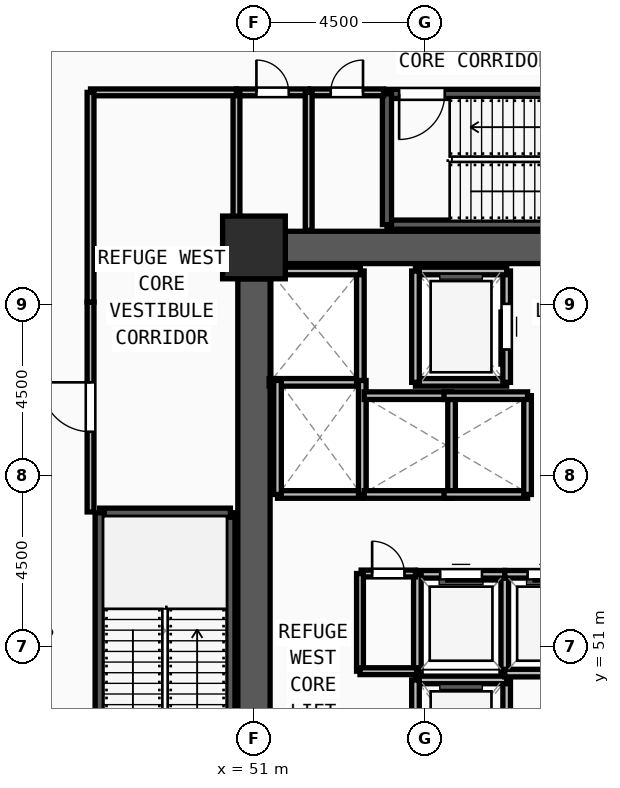
"""IFC4 building model, lengths in metres.
Left out: names, types, materials, properties, quantities, classifications, styles, units other than length and angle.
Written with IfcOpenShell. Run it as: python <this file> out.ifc"""

import sys

from ifc_helpers import new_model, si_unit, direction, frame, frame_2d, origin, origin_2d, place, context, subcontext, project, spatial, rectangle, extrude, source, transform, mapped, element, fill, save


model = new_model("IFC4")
c1 = context("Model", 3, precision=1e-05, world=origin(), true_north=direction((0.0, 1.0)))
c2 = subcontext(c1, "Body", "Model", "MODEL_VIEW")
j1 = project(units=[si_unit("LENGTHUNIT", "METRE"), si_unit("PLANEANGLEUNIT", "RADIAN")], contexts=[c1])
p1 = place(None, origin())
s1 = spatial("IfcSite", under=j1, at=p1, CompositionType="ELEMENT")
p2 = place(p1, origin())
s2 = spatial("IfcBuilding", under=s1, at=p2, CompositionType="ELEMENT")
p3 = place(p2, frame((0.0, 0.0, 93.0)))
s3 = spatial("IfcBuildingStorey", under=s2, at=p3, CompositionType="ELEMENT", Elevation=93.0)
m1 = source(origin(), c2, "Body", "SweptSolid", [
    extrude(rectangle(XDim=1.65, YDim=1.65, at=origin_2d()), origin(), (0.0, 0.0, 1.0), 4.5),
])
p4 = place(p3, frame((51.0, 61.5, 0.0), z_axis=(0.0, 0.0, 1.0), x_axis=(1.0, 0.0, 0.0)))
e1 = element("IfcColumn", 1, at=p4, inside=s3, PredefinedType="COLUMN", context=c2, shape_type="MappedRepresentation", body=[
    mapped(m1, transform((0.0, 0.0, 0.0), x_axis=(1.0, 0.0, 0.0), y_axis=(0.0, 1.0, 0.0), z_axis=(0.0, 0.0, 1.0), scale=1.0)),
])
p5 = place(p3, frame((51.825, 61.5, 0.0), z_axis=(0.0, 0.0, 1.0), x_axis=(1.0, 0.0, 0.0)))
e2 = element("IfcWall", 2, at=p5, inside=s3, PredefinedType="SHEAR", context=c2, shape_type="SweptSolid", body=[
    extrude(rectangle(XDim=7.35, YDim=0.85, at=frame_2d((3.675, 0.0))), origin(), (0.0, 0.0, 1.0), 4.22),
])
p6 = place(p3, frame((51.0, 47.325, 0.0), z_axis=(0.0, 0.0, 1.0), x_axis=(0.0, 1.0, 0.0)))
e3 = element("IfcWall", 3, at=p6, inside=s3, PredefinedType="SHEAR", context=c2, shape_type="SweptSolid", body=[
    extrude(rectangle(XDim=13.35, YDim=0.85, at=frame_2d((6.675, 0.0))), origin(), (0.0, 0.0, 1.0), 4.22),
])
p7 = place(p3, frame((50.38, 46.7, 0.0), z_axis=(0.0, 0.0, 1.0), x_axis=(0.0, 1.0, 0.0)))
e4 = element("IfcWall", 4, at=p7, inside=s3, PredefinedType="SOLIDWALL", context=c2, shape_type="SweptSolid", body=[
    extrude(rectangle(XDim=7.82, YDim=0.24, at=frame_2d((3.91, 0.0))), origin(), (0.0, 0.0, 1.0), 4.22),
])
p8 = place(p3, frame((50.38, 54.52, 0.0), z_axis=(0.0, 0.0, 1.0), x_axis=(-1.0, 0.0, 0.0)))
e5 = element("IfcWall", 5, at=p8, inside=s3, PredefinedType="SOLIDWALL", context=c2, shape_type="SweptSolid", body=[
    extrude(rectangle(XDim=3.44, YDim=0.24, at=frame_2d((1.72, 0.0))), origin(), (0.0, 0.0, 1.0), 4.22),
])
p9 = place(p3, frame((46.94, 54.52, 0.0), z_axis=(0.0, 0.0, 1.0), x_axis=(0.0, -1.0, 0.0)))
e6 = element("IfcWall", 6, at=p9, inside=s3, PredefinedType="SOLIDWALL", context=c2, shape_type="SweptSolid", body=[
    extrude(rectangle(XDim=7.82, YDim=0.24, at=frame_2d((3.91, 0.0))), origin(), (0.0, 0.0, 1.0), 4.22),
])
m2 = source(origin(), c2, "Body", "SweptSolid", [
    extrude(rectangle(XDim=1.2, YDim=2.2, at=frame_2d((0.6, 1.1))), frame((0.0, 0.13, 0.0), z_axis=(0.0, -1.0, 0.0), x_axis=(1.0, 0.0, 0.0)), (0.0, 0.0, 1.0), 0.26),
])
p10 = place(p9, frame((6.3, 0.0, 0.0)))
e7 = element("IfcOpeningElement", 7, at=p10, cuts=e6, PredefinedType="OPENING", context=c2, shape_type="MappedRepresentation", body=[
    mapped(m2, transform((0.0, 0.0, 0.0), x_axis=(1.0, 0.0, 0.0), y_axis=(0.0, 1.0, 0.0), z_axis=(0.0, 0.0, 1.0), scale=1.0)),
])
p11 = place(p3, frame((54.5, 62.1, 0.0), z_axis=(0.0, 0.0, 1.0), x_axis=(1.0, 0.0, 0.0)))
e8 = element("IfcWall", 8, at=p11, inside=s3, PredefinedType="SOLIDWALL", context=c2, shape_type="SweptSolid", body=[
    extrude(rectangle(XDim=7.82, YDim=0.24, at=frame_2d((3.91, 0.0))), origin(), (0.0, 0.0, 1.0), 4.22),
])
p12 = place(p3, frame((62.32, 65.54, 0.0), z_axis=(0.0, 0.0, 1.0), x_axis=(-1.0, 0.0, 0.0)))
e9 = element("IfcWall", 9, at=p12, inside=s3, PredefinedType="SOLIDWALL", context=c2, shape_type="SweptSolid", body=[
    extrude(rectangle(XDim=7.82, YDim=0.24, at=frame_2d((3.91, 0.0))), origin(), (0.0, 0.0, 1.0), 4.22),
])
p13 = place(p12, frame((6.3, 0.0, 0.0)))
e10 = element("IfcOpeningElement", 10, at=p13, cuts=e9, PredefinedType="OPENING", context=c2, shape_type="MappedRepresentation", body=[
    mapped(m2, transform((0.0, 0.0, 0.0), x_axis=(1.0, 0.0, 0.0), y_axis=(0.0, 1.0, 0.0), z_axis=(0.0, 0.0, 1.0), scale=1.0)),
])
p14 = place(p3, frame((54.5, 65.54, 0.0), z_axis=(0.0, 0.0, 1.0), x_axis=(0.0, -1.0, 0.0)))
e11 = element("IfcWall", 11, at=p14, inside=s3, PredefinedType="SOLIDWALL", context=c2, shape_type="SweptSolid", body=[
    extrude(rectangle(XDim=3.44, YDim=0.24, at=frame_2d((1.72, 0.0))), origin(), (0.0, 0.0, 1.0), 4.22),
])
p15 = place(p3, frame((57.65, 47.12, 0.0), z_axis=(0.0, 0.0, 1.0), x_axis=(0.0, 1.0, 0.0)))
e12 = element("IfcWall", 12, at=p15, inside=s3, PredefinedType="SOLIDWALL", context=c2, shape_type="SweptSolid", body=[
    extrude(rectangle(XDim=3.0, YDim=0.2, at=frame_2d((1.5, 0.0))), origin(), (0.0, 0.0, 1.0), 4.22),
])
m3 = source(origin(), c2, "Body", "SweptSolid", [
    extrude(rectangle(XDim=1.2, YDim=2.3, at=frame_2d((0.6, 1.15))), frame((0.0, 0.11, 0.0), z_axis=(0.0, -1.0, 0.0), x_axis=(1.0, 0.0, 0.0)), (0.0, 0.0, 1.0), 0.22),
])
p16 = place(p15, frame((0.9, 0.0, 0.0)))
e13 = element("IfcOpeningElement", 13, at=p16, cuts=e12, PredefinedType="OPENING", context=c2, shape_type="MappedRepresentation", body=[
    mapped(m3, transform((0.0, 0.0, 0.0), x_axis=(1.0, 0.0, 0.0), y_axis=(0.0, 1.0, 0.0), z_axis=(0.0, 0.0, 1.0), scale=1.0)),
])
p17 = place(p3, frame((57.65, 50.12, 0.0), z_axis=(0.0, 0.0, 1.0), x_axis=(-1.0, 0.0, 0.0)))
e14 = element("IfcWall", 14, at=p17, inside=s3, PredefinedType="SOLIDWALL", context=c2, shape_type="SweptSolid", body=[
    extrude(rectangle(XDim=2.4, YDim=0.2, at=frame_2d((1.2, 0.0))), origin(), (0.0, 0.0, 1.0), 4.22),
])
p18 = place(p3, frame((55.25, 50.12, 0.0), z_axis=(0.0, 0.0, 1.0), x_axis=(0.0, -1.0, 0.0)))
e15 = element("IfcWall", 15, at=p18, inside=s3, PredefinedType="SOLIDWALL", context=c2, shape_type="SweptSolid", body=[
    extrude(rectangle(XDim=3.0, YDim=0.2, at=frame_2d((1.5, 0.0))), origin(), (0.0, 0.0, 1.0), 4.22),
])
p19 = place(p3, frame((55.25, 57.95, 0.0), z_axis=(0.0, 0.0, 1.0), x_axis=(1.0, 0.0, 0.0)))
e16 = element("IfcWall", 16, at=p19, inside=s3, PredefinedType="SOLIDWALL", context=c2, shape_type="SweptSolid", body=[
    extrude(rectangle(XDim=2.4, YDim=0.2, at=frame_2d((1.2, 0.0))), origin(), (0.0, 0.0, 1.0), 4.22),
])
p20 = place(p3, frame((57.65, 57.95, 0.0), z_axis=(0.0, 0.0, 1.0), x_axis=(0.0, 1.0, 0.0)))
e17 = element("IfcWall", 17, at=p20, inside=s3, PredefinedType="SOLIDWALL", context=c2, shape_type="SweptSolid", body=[
    extrude(rectangle(XDim=2.93, YDim=0.2, at=frame_2d((1.465, 0.0))), origin(), (0.0, 0.0, 1.0), 4.22),
])
p21 = place(p20, frame((0.865, 0.0, 0.0)))
e18 = element("IfcOpeningElement", 18, at=p21, cuts=e17, PredefinedType="OPENING", context=c2, shape_type="MappedRepresentation", body=[
    mapped(m3, transform((0.0, 0.0, 0.0), x_axis=(1.0, 0.0, 0.0), y_axis=(0.0, 1.0, 0.0), z_axis=(0.0, 0.0, 1.0), scale=1.0)),
])
p22 = place(p3, frame((57.65, 60.88, 0.0), z_axis=(0.0, 0.0, 1.0), x_axis=(-1.0, 0.0, 0.0)))
e19 = element("IfcWall", 19, at=p22, inside=s3, PredefinedType="SOLIDWALL", context=c2, shape_type="SweptSolid", body=[
    extrude(rectangle(XDim=2.4, YDim=0.2, at=frame_2d((1.2, 0.0))), origin(), (0.0, 0.0, 1.0), 4.22),
])
p23 = place(p3, frame((55.25, 60.88, 0.0), z_axis=(0.0, 0.0, 1.0), x_axis=(0.0, -1.0, 0.0)))
e20 = element("IfcWall", 20, at=p23, inside=s3, PredefinedType="SOLIDWALL", context=c2, shape_type="SweptSolid", body=[
    extrude(rectangle(XDim=2.93, YDim=0.2, at=frame_2d((1.465, 0.0))), origin(), (0.0, 0.0, 1.0), 4.22),
])
p24 = place(p3, frame((51.4, 57.95, 0.0), z_axis=(0.0, 0.0, 1.0), x_axis=(1.0, 0.0, 0.0)))
e21 = element("IfcWall", 21, at=p24, inside=s3, PredefinedType="SOLIDWALL", context=c2, shape_type="SweptSolid", body=[
    extrude(rectangle(XDim=2.4, YDim=0.2, at=frame_2d((1.2, 0.0))), origin(), (0.0, 0.0, 1.0), 4.22),
])
p25 = place(p3, frame((53.8, 57.95, 0.0), z_axis=(0.0, 0.0, 1.0), x_axis=(0.0, 1.0, 0.0)))
e22 = element("IfcWall", 22, at=p25, inside=s3, PredefinedType="SOLIDWALL", context=c2, shape_type="SweptSolid", body=[
    extrude(rectangle(XDim=2.93, YDim=0.2, at=frame_2d((1.465, 0.0))), origin(), (0.0, 0.0, 1.0), 4.22),
])
p26 = place(p3, frame((53.8, 60.88, 0.0), z_axis=(0.0, 0.0, 1.0), x_axis=(-1.0, 0.0, 0.0)))
e23 = element("IfcWall", 23, at=p26, inside=s3, PredefinedType="SOLIDWALL", context=c2, shape_type="SweptSolid", body=[
    extrude(rectangle(XDim=2.4, YDim=0.2, at=frame_2d((1.2, 0.0))), origin(), (0.0, 0.0, 1.0), 4.22),
])
p27 = place(p3, frame((51.62, 55.0, 0.0), z_axis=(0.0, 0.0, 1.0), x_axis=(1.0, 0.0, 0.0)))
e24 = element("IfcWall", 24, at=p27, inside=s3, PredefinedType="SOLIDWALL", context=c2, shape_type="SweptSolid", body=[
    extrude(rectangle(XDim=2.23, YDim=0.2, at=frame_2d((1.115, 0.0))), origin(), (0.0, 0.0, 1.0), 4.22),
])
for number, where, z_axis, x_axis in (
    (25, (53.85, 55.0, 0.0), (0.0, 0.0, 1.0), (0.0, 1.0, 0.0)),
    (26, (51.62, 58.0, 0.0), (0.0, 0.0, 1.0), (0.0, -1.0, 0.0)),
):
    element("IfcWall", number, at=place(p3, frame(where, z_axis=z_axis, x_axis=x_axis)), inside=s3, PredefinedType="SOLIDWALL", context=c2, shape_type="SweptSolid", body=[
        extrude(rectangle(XDim=3.0, YDim=0.2, at=frame_2d((1.5, 0.0))), origin(), (0.0, 0.0, 1.0), 4.22),
    ])
p28 = place(p3, frame((57.6, 50.3, 0.0), z_axis=(0.0, 0.0, 1.0), x_axis=(0.0, 1.0, 0.0)))
e27 = element("IfcWall", 27, at=p28, inside=s3, PredefinedType="SOLIDWALL", context=c2, shape_type="SweptSolid", body=[
    extrude(rectangle(XDim=2.6, YDim=0.2, at=frame_2d((1.3, 0.0))), origin(), (0.0, 0.0, 1.0), 4.22),
])
p29 = place(p3, frame((57.6, 52.9, 0.0), z_axis=(0.0, 0.0, 1.0), x_axis=(-1.0, 0.0, 0.0)))
e28 = element("IfcWall", 28, at=p29, inside=s3, PredefinedType="SOLIDWALL", context=c2, shape_type="SweptSolid", body=[
    extrude(rectangle(XDim=2.3, YDim=0.2, at=frame_2d((1.15, 0.0))), origin(), (0.0, 0.0, 1.0), 4.22),
])
m4 = source(origin(), c2, "Body", "SweptSolid", [
    extrude(rectangle(XDim=1.1, YDim=2.2, at=frame_2d((0.55, 1.1))), frame((0.0, 0.11, 0.0), z_axis=(0.0, -1.0, 0.0), x_axis=(1.0, 0.0, 0.0)), (0.0, 0.0, 1.0), 0.22),
])
p30 = place(p29, frame((0.6, 0.0, 0.0)))
e29 = element("IfcOpeningElement", 29, at=p30, cuts=e28, PredefinedType="OPENING", context=c2, shape_type="MappedRepresentation", body=[
    mapped(m4, transform((0.0, 0.0, 0.0), x_axis=(1.0, 0.0, 0.0), y_axis=(0.0, 1.0, 0.0), z_axis=(0.0, 0.0, 1.0), scale=1.0)),
])
p31 = place(p3, frame((55.3, 52.9, 0.0), z_axis=(0.0, 0.0, 1.0), x_axis=(0.0, -1.0, 0.0)))
e30 = element("IfcWall", 30, at=p31, inside=s3, PredefinedType="SOLIDWALL", context=c2, shape_type="SweptSolid", body=[
    extrude(rectangle(XDim=2.6, YDim=0.2, at=frame_2d((1.3, 0.0))), origin(), (0.0, 0.0, 1.0), 4.22),
])
p32 = place(p3, frame((57.6, 50.3, 0.0), z_axis=(0.0, 0.0, 1.0), x_axis=(1.0, 0.0, 0.0)))
e31 = element("IfcWall", 31, at=p32, inside=s3, PredefinedType="SOLIDWALL", context=c2, shape_type="SweptSolid", body=[
    extrude(rectangle(XDim=2.3, YDim=0.2, at=frame_2d((1.15, 0.0))), origin(), (0.0, 0.0, 1.0), 4.22),
])
p33 = place(p3, frame((59.9, 52.9, 0.0), z_axis=(0.0, 0.0, 1.0), x_axis=(-1.0, 0.0, 0.0)))
e32 = element("IfcWall", 32, at=p33, inside=s3, PredefinedType="SOLIDWALL", context=c2, shape_type="SweptSolid", body=[
    extrude(rectangle(XDim=2.3, YDim=0.2, at=frame_2d((1.15, 0.0))), origin(), (0.0, 0.0, 1.0), 4.22),
])
p34 = place(p33, frame((0.6, 0.0, 0.0)))
e33 = element("IfcOpeningElement", 33, at=p34, cuts=e32, PredefinedType="OPENING", context=c2, shape_type="MappedRepresentation", body=[
    mapped(m4, transform((0.0, 0.0, 0.0), x_axis=(1.0, 0.0, 0.0), y_axis=(0.0, 1.0, 0.0), z_axis=(0.0, 0.0, 1.0), scale=1.0)),
])
p35 = place(p3, frame((53.9, 55.0, 0.0), z_axis=(0.0, 0.0, 1.0), x_axis=(1.0, 0.0, 0.0)))
e34 = element("IfcWall", 34, at=p35, inside=s3, PredefinedType="SOLIDWALL", context=c2, shape_type="SweptSolid", body=[
    extrude(rectangle(XDim=2.3, YDim=0.2, at=frame_2d((1.15, 0.0))), origin(), (0.0, 0.0, 1.0), 4.22),
])
p36 = place(p3, frame((56.2, 55.0, 0.0), z_axis=(0.0, 0.0, 1.0), x_axis=(0.0, 1.0, 0.0)))
e35 = element("IfcWall", 35, at=p36, inside=s3, PredefinedType="SOLIDWALL", context=c2, shape_type="SweptSolid", body=[
    extrude(rectangle(XDim=2.6, YDim=0.2, at=frame_2d((1.3, 0.0))), origin(), (0.0, 0.0, 1.0), 4.22),
])
p37 = place(p3, frame((56.2, 57.6, 0.0), z_axis=(0.0, 0.0, 1.0), x_axis=(-1.0, 0.0, 0.0)))
e36 = element("IfcWall", 36, at=p37, inside=s3, PredefinedType="SOLIDWALL", context=c2, shape_type="SweptSolid", body=[
    extrude(rectangle(XDim=2.3, YDim=0.2, at=frame_2d((1.15, 0.0))), origin(), (0.0, 0.0, 1.0), 4.22),
])
p38 = place(p3, frame((56.0, 55.0, 0.0), z_axis=(0.0, 0.0, 1.0), x_axis=(1.0, 0.0, 0.0)))
e37 = element("IfcWall", 37, at=p38, inside=s3, PredefinedType="SOLIDWALL", context=c2, shape_type="SweptSolid", body=[
    extrude(rectangle(XDim=2.2, YDim=0.2, at=frame_2d((1.1, 0.0))), origin(), (0.0, 0.0, 1.0), 4.22),
])
p39 = place(p3, frame((58.2, 55.0, 0.0), z_axis=(0.0, 0.0, 1.0), x_axis=(0.0, 1.0, 0.0)))
e38 = element("IfcWall", 38, at=p39, inside=s3, PredefinedType="SOLIDWALL", context=c2, shape_type="SweptSolid", body=[
    extrude(rectangle(XDim=2.6, YDim=0.2, at=frame_2d((1.3, 0.0))), origin(), (0.0, 0.0, 1.0), 4.22),
])
p40 = place(p3, frame((58.2, 57.6, 0.0), z_axis=(0.0, 0.0, 1.0), x_axis=(-1.0, 0.0, 0.0)))
e39 = element("IfcWall", 39, at=p40, inside=s3, PredefinedType="SOLIDWALL", context=c2, shape_type="SweptSolid", body=[
    extrude(rectangle(XDim=2.2, YDim=0.2, at=frame_2d((1.1, 0.0))), origin(), (0.0, 0.0, 1.0), 4.22),
])
p41 = place(p3, frame((53.82, 52.92, 0.0), z_axis=(0.0, 0.0, 1.0), x_axis=(1.0, 0.0, 0.0)))
e40 = element("IfcWall", 40, at=p41, inside=s3, PredefinedType="PARTITIONING", context=c2, shape_type="SweptSolid", body=[
    extrude(rectangle(XDim=1.43, YDim=0.18, at=frame_2d((0.715, 0.0))), origin(), (0.0, 0.0, 1.0), 4.22),
])
m5 = source(origin(), c2, "Body", "SweptSolid", [
    extrude(rectangle(XDim=0.85, YDim=2.1, at=frame_2d((0.425, 1.05))), frame((0.0, 0.1, 0.0), z_axis=(0.0, -1.0, 0.0), x_axis=(1.0, 0.0, 0.0)), (0.0, 0.0, 1.0), 0.2),
])
p42 = place(p41, frame((0.29, 0.0, 0.0)))
e41 = element("IfcOpeningElement", 41, at=p42, cuts=e40, PredefinedType="OPENING", context=c2, shape_type="MappedRepresentation", body=[
    mapped(m5, transform((0.0, 0.0, 0.0), x_axis=(1.0, 0.0, 0.0), y_axis=(0.0, 1.0, 0.0), z_axis=(0.0, 0.0, 1.0), scale=1.0)),
])
p43 = place(p3, frame((50.54, 65.58, 0.0), z_axis=(0.0, 0.0, 1.0), x_axis=(1.0, 0.0, 0.0)))
e42 = element("IfcWall", 42, at=p43, inside=s3, PredefinedType="PARTITIONING", context=c2, shape_type="SweptSolid", body=[
    extrude(rectangle(XDim=1.9, YDim=0.18, at=frame_2d((0.95, 0.0))), origin(), (0.0, 0.0, 1.0), 4.22),
])
p44 = place(p43, frame((0.525, 0.0, 0.0)))
e43 = element("IfcOpeningElement", 43, at=p44, cuts=e42, PredefinedType="OPENING", context=c2, shape_type="MappedRepresentation", body=[
    mapped(m5, transform((0.0, 0.0, 0.0), x_axis=(1.0, 0.0, 0.0), y_axis=(0.0, 1.0, 0.0), z_axis=(0.0, 0.0, 1.0), scale=1.0)),
])
p45 = place(p3, frame((52.48, 65.58, 0.0), z_axis=(0.0, 0.0, 1.0), x_axis=(1.0, 0.0, 0.0)))
e44 = element("IfcWall", 44, at=p45, inside=s3, PredefinedType="PARTITIONING", context=c2, shape_type="SweptSolid", body=[
    extrude(rectangle(XDim=1.93, YDim=0.18, at=frame_2d((0.965, 0.0))), origin(), (0.0, 0.0, 1.0), 4.22),
])
p46 = place(p45, frame((0.54, 0.0, 0.0)))
e45 = element("IfcOpeningElement", 45, at=p46, cuts=e44, PredefinedType="OPENING", context=c2, shape_type="MappedRepresentation", body=[
    mapped(m5, transform((0.0, 0.0, 0.0), x_axis=(1.0, 0.0, 0.0), y_axis=(0.0, 1.0, 0.0), z_axis=(0.0, 0.0, 1.0), scale=1.0)),
])
p47 = place(p3, frame((46.7, 54.54, 0.0), z_axis=(0.0, 0.0, 1.0), x_axis=(0.0, 1.0, 0.0)))
e46 = element("IfcWall", 46, at=p47, inside=s3, PredefinedType="PARTITIONING", context=c2, shape_type="SweptSolid", body=[
    extrude(rectangle(XDim=5.52, YDim=0.18, at=frame_2d((2.76, 0.0))), origin(), (0.0, 0.0, 1.0), 4.22),
])
m6 = source(origin(), c2, "Body", "SweptSolid", [
    extrude(rectangle(XDim=1.3, YDim=2.2, at=frame_2d((0.65, 1.1))), frame((0.0, 0.1, 0.0), z_axis=(0.0, -1.0, 0.0), x_axis=(1.0, 0.0, 0.0)), (0.0, 0.0, 1.0), 0.2),
])
p48 = place(p47, frame((2.11, 0.0, 0.0)))
e47 = element("IfcOpeningElement", 47, at=p48, cuts=e46, PredefinedType="OPENING", context=c2, shape_type="MappedRepresentation", body=[
    mapped(m6, transform((0.0, 0.0, 0.0), x_axis=(1.0, 0.0, 0.0), y_axis=(0.0, 1.0, 0.0), z_axis=(0.0, 0.0, 1.0), scale=1.0)),
])
p49 = place(p3, frame((53.79, 50.35, 0.0), z_axis=(0.0, 0.0, 1.0), x_axis=(0.0, 1.0, 0.0)))
e48 = element("IfcWall", 48, at=p49, inside=s3, PredefinedType="PARTITIONING", context=c2, shape_type="SweptSolid", body=[
    extrude(rectangle(XDim=2.57, YDim=0.18, at=frame_2d((1.285, 0.0))), origin(), (0.0, 0.0, 1.0), 4.22),
])
p50 = place(p3, frame((53.79, 50.35, 0.0), z_axis=(0.0, 0.0, 1.0), x_axis=(1.0, 0.0, 0.0)))
e49 = element("IfcWall", 49, at=p50, inside=s3, PredefinedType="PARTITIONING", context=c2, shape_type="SweptSolid", body=[
    extrude(rectangle(XDim=1.49, YDim=0.18, at=frame_2d((0.745, 0.0))), origin(), (0.0, 0.0, 1.0), 4.22),
])
for number, where, z_axis, x_axis in (
    (50, (50.54, 61.95, 0.0), (0.0, 0.0, 1.0), (0.0, 1.0, 0.0)),
    (51, (52.44, 61.95, 0.0), (0.0, 0.0, 1.0), (0.0, 1.0, 0.0)),
):
    element("IfcWall", number, at=place(p3, frame(where, z_axis=z_axis, x_axis=x_axis)), inside=s3, PredefinedType="PARTITIONING", context=c2, shape_type="SweptSolid", body=[
        extrude(rectangle(XDim=3.63, YDim=0.18, at=frame_2d((1.815, 0.0))), origin(), (0.0, 0.0, 1.0), 4.22),
    ])
p51 = place(p3, frame((46.7, 65.58, 0.0), z_axis=(0.0, 0.0, 1.0), x_axis=(1.0, 0.0, 0.0)))
e52 = element("IfcWall", 52, at=p51, inside=s3, PredefinedType="PARTITIONING", context=c2, shape_type="SweptSolid", body=[
    extrude(rectangle(XDim=3.84, YDim=0.18, at=frame_2d((1.92, 0.0))), origin(), (0.0, 0.0, 1.0), 4.22),
])
p52 = place(p3, frame((46.7, 60.06, 0.0), z_axis=(0.0, 0.0, 1.0), x_axis=(0.0, 1.0, 0.0)))
e53 = element("IfcWall", 53, at=p52, inside=s3, PredefinedType="PARTITIONING", context=c2, shape_type="SweptSolid", body=[
    extrude(rectangle(XDim=5.52, YDim=0.18, at=frame_2d((2.76, 0.0))), origin(), (0.0, 0.0, 1.0), 4.22),
])
m7 = source(origin(), c2, "Body", "SweptSolid", [
    extrude(rectangle(XDim=1.2, YDim=2.2, at=frame_2d((0.6, 1.1))), frame((0.0, 0.025, 0.0), z_axis=(0.0, -1.0, 0.0), x_axis=(1.0, 0.0, 0.0)), (0.0, 0.0, 1.0), 0.05),
])
p53 = place(p13, origin())
e54 = element("IfcDoor", 54, at=p53, inside=s3, OperationType="SINGLE_SWING_RIGHT", PredefinedType="DOOR", context=c2, shape_type="MappedRepresentation", body=[
    mapped(m7, transform((0.0, 0.0, 0.0), x_axis=(1.0, 0.0, 0.0), y_axis=(0.0, 1.0, 0.0), z_axis=(0.0, 0.0, 1.0), scale=1.0)),
])
fill(e10, e54)
m8 = source(origin(), c2, "Body", "SweptSolid", [
    extrude(rectangle(XDim=1.2, YDim=2.3, at=frame_2d((0.6, 1.15))), frame((0.0, 0.025, 0.0), z_axis=(0.0, -1.0, 0.0), x_axis=(1.0, 0.0, 0.0)), (0.0, 0.0, 1.0), 0.05),
])
p54 = place(p21, origin())
e55 = element("IfcDoor", 55, at=p54, inside=s3, OperationType="SLIDING_TO_LEFT", PredefinedType="DOOR", context=c2, shape_type="MappedRepresentation", body=[
    mapped(m8, transform((0.0, 0.0, 0.0), x_axis=(1.0, 0.0, 0.0), y_axis=(0.0, 1.0, 0.0), z_axis=(0.0, 0.0, 1.0), scale=1.0)),
])
fill(e18, e55)
m9 = source(origin(), c2, "Body", "SweptSolid", [
    extrude(rectangle(XDim=1.1, YDim=2.2, at=frame_2d((0.55, 1.1))), frame((0.0, 0.025, 0.0), z_axis=(0.0, -1.0, 0.0), x_axis=(1.0, 0.0, 0.0)), (0.0, 0.0, 1.0), 0.05),
])
p55 = place(p30, origin())
e56 = element("IfcDoor", 56, at=p55, inside=s3, OperationType="SLIDING_TO_LEFT", PredefinedType="DOOR", context=c2, shape_type="MappedRepresentation", body=[
    mapped(m9, transform((0.0, 0.0, 0.0), x_axis=(1.0, 0.0, 0.0), y_axis=(0.0, 1.0, 0.0), z_axis=(0.0, 0.0, 1.0), scale=1.0)),
])
fill(e29, e56)
p56 = place(p34, origin())
e57 = element("IfcDoor", 57, at=p56, inside=s3, OperationType="SLIDING_TO_LEFT", PredefinedType="DOOR", context=c2, shape_type="MappedRepresentation", body=[
    mapped(m9, transform((0.0, 0.0, 0.0), x_axis=(1.0, 0.0, 0.0), y_axis=(0.0, 1.0, 0.0), z_axis=(0.0, 0.0, 1.0), scale=1.0)),
])
fill(e33, e57)
m10 = source(origin(), c2, "Body", "SweptSolid", [
    extrude(rectangle(XDim=0.85, YDim=2.1, at=frame_2d((0.425, 1.05))), frame((0.0, 0.025, 0.0), z_axis=(0.0, -1.0, 0.0), x_axis=(1.0, 0.0, 0.0)), (0.0, 0.0, 1.0), 0.05),
])
p57 = place(p42, origin())
e58 = element("IfcDoor", 58, at=p57, inside=s3, OperationType="SINGLE_SWING_LEFT", PredefinedType="DOOR", context=c2, shape_type="MappedRepresentation", body=[
    mapped(m10, transform((0.0, 0.0, 0.0), x_axis=(1.0, 0.0, 0.0), y_axis=(0.0, 1.0, 0.0), z_axis=(0.0, 0.0, 1.0), scale=1.0)),
])
fill(e41, e58)
p58 = place(p44, origin())
e59 = element("IfcDoor", 59, at=p58, inside=s3, OperationType="SINGLE_SWING_LEFT", PredefinedType="DOOR", context=c2, shape_type="MappedRepresentation", body=[
    mapped(m10, transform((0.0, 0.0, 0.0), x_axis=(1.0, 0.0, 0.0), y_axis=(0.0, 1.0, 0.0), z_axis=(0.0, 0.0, 1.0), scale=1.0)),
])
fill(e43, e59)
p59 = place(p46, origin())
e60 = element("IfcDoor", 60, at=p59, inside=s3, OperationType="SINGLE_SWING_RIGHT", PredefinedType="DOOR", context=c2, shape_type="MappedRepresentation", body=[
    mapped(m10, transform((0.0, 0.0, 0.0), x_axis=(1.0, 0.0, 0.0), y_axis=(0.0, 1.0, 0.0), z_axis=(0.0, 0.0, 1.0), scale=1.0)),
])
fill(e45, e60)
m11 = source(origin(), c2, "Body", "SweptSolid", [
    extrude(rectangle(XDim=1.3, YDim=2.2, at=frame_2d((0.65, 1.1))), frame((0.0, 0.025, 0.0), z_axis=(0.0, -1.0, 0.0), x_axis=(1.0, 0.0, 0.0)), (0.0, 0.0, 1.0), 0.05),
])
p60 = place(p48, origin())
e61 = element("IfcDoor", 61, at=p60, inside=s3, OperationType="SINGLE_SWING_RIGHT", PredefinedType="DOOR", context=c2, shape_type="MappedRepresentation", body=[
    mapped(m11, transform((0.0, 0.0, 0.0), x_axis=(1.0, 0.0, 0.0), y_axis=(0.0, 1.0, 0.0), z_axis=(0.0, 0.0, 1.0), scale=1.0)),
])
fill(e47, e61)
save(model, sys.argv[1])
